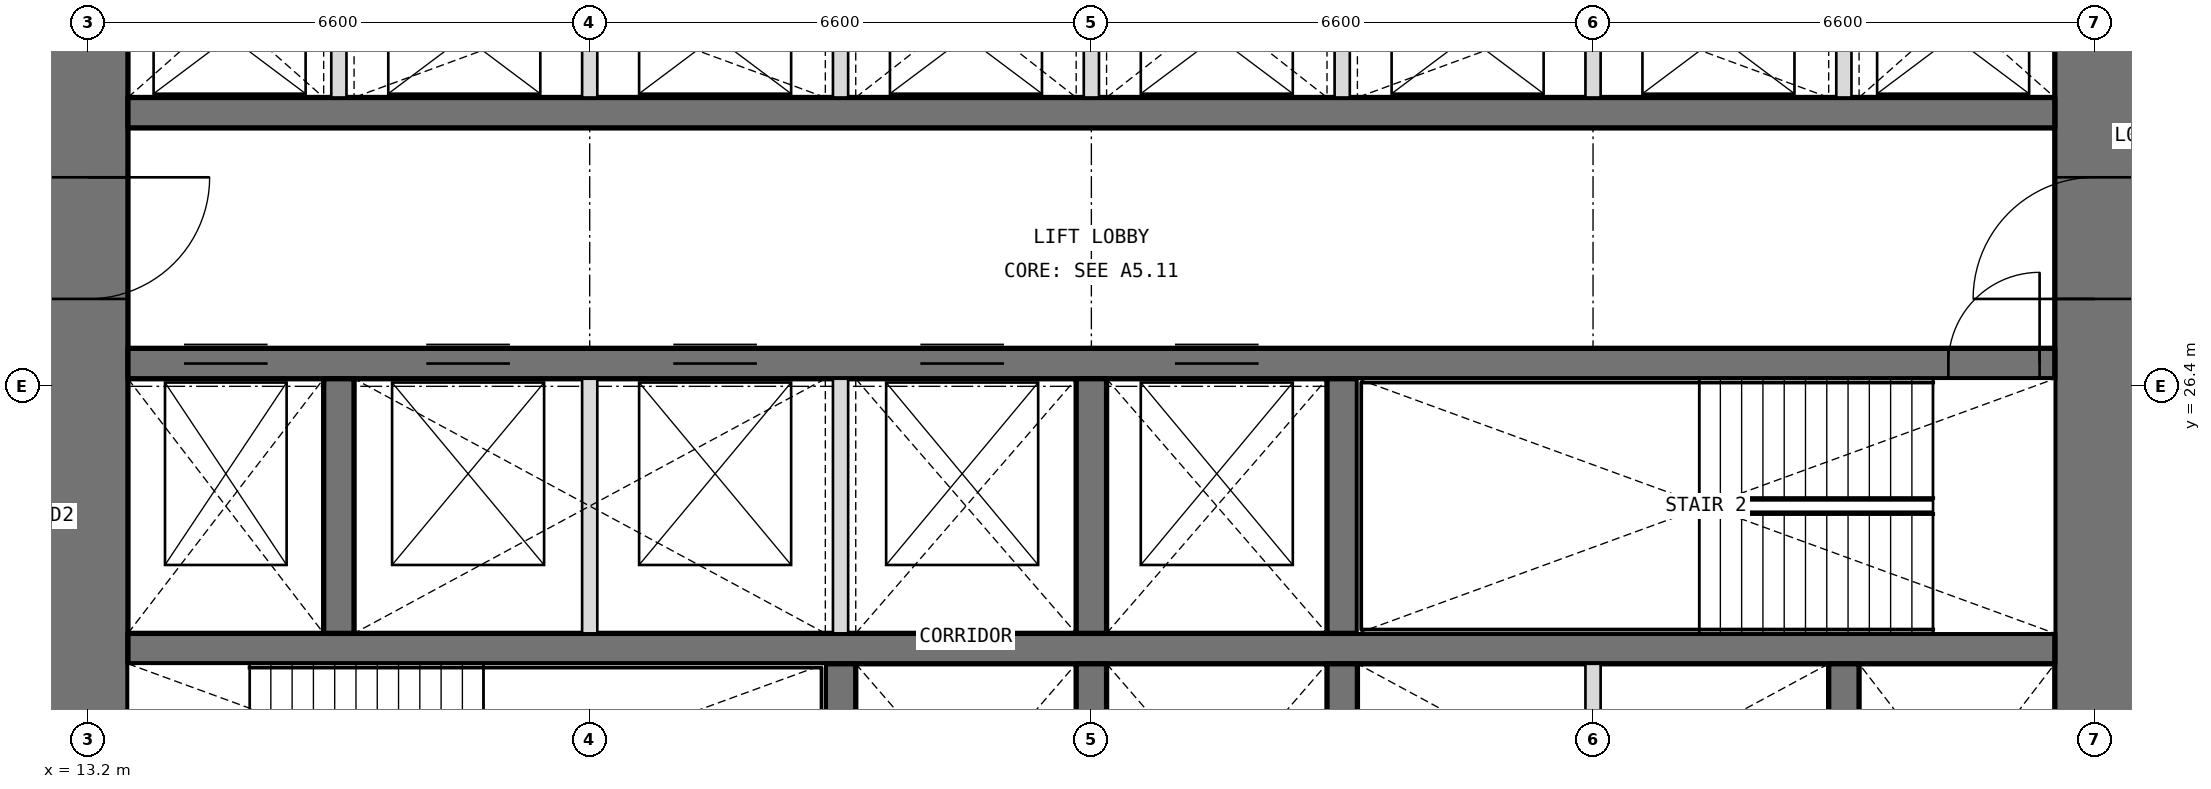
"""IFC4 building model, lengths in metres.
Left out: names, types, materials, properties, quantities, classifications, styles, units other than length and angle.
Written with IfcOpenShell. Run it as: python <this file> out.ifc"""

import sys

from ifc_helpers import new_model, si_unit, direction, frame, frame_2d, origin, place, context, subcontext, project, spatial, rectangle, extrude, element, fill, save


model = new_model("IFC4")
c1 = context("Model", 3, precision=1e-05, world=origin(), true_north=direction((0.0, 1.0)))
c2 = subcontext(c1, "Body", "Model", "MODEL_VIEW")
j1 = project(units=[si_unit("LENGTHUNIT", "METRE"), si_unit("PLANEANGLEUNIT", "RADIAN")], contexts=[c1])
p1 = place(None, origin())
s1 = spatial("IfcSite", under=j1, at=p1, CompositionType="ELEMENT")
p2 = place(p1, origin())
s2 = spatial("IfcBuilding", under=s1, at=p2, CompositionType="ELEMENT")
p3 = place(p2, frame((0.0, 0.0, 42.3)))
s3 = spatial("IfcBuildingStorey", under=s2, at=p3, CompositionType="ELEMENT", Elevation=42.3)
p4 = place(p3, frame((39.6, 13.725, 0.0), z_axis=(0.0, 0.0, 1.0), x_axis=(0.0, 1.0, 0.0)))
e1 = element("IfcWall", 1, at=p4, inside=s3, PredefinedType="SHEAR", context=c2, shape_type="SweptSolid", body=[
    extrude(rectangle(XDim=18.75, YDim=1.05, at=frame_2d((9.375, 0.0))), origin(), (0.0, 0.0, 1.0), 4.2),
])
p5 = place(p4, frame((3.025, 0.0, 0.0)))
e2 = element("IfcOpeningElement", 2, at=p5, cuts=e1, PredefinedType="OPENING", context=c2, shape_type="SweptSolid", body=[
    extrude(rectangle(XDim=1.6, YDim=2.1, at=frame_2d((0.8, 1.05))), frame((0.0, 0.535, 0.0), z_axis=(0.0, -1.0, 0.0), x_axis=(1.0, 0.0, 0.0)), (0.0, 0.0, 1.0), 1.07),
])
p6 = place(p4, frame((13.825, 0.0, 0.0)))
e3 = element("IfcOpeningElement", 3, at=p6, cuts=e1, PredefinedType="OPENING", context=c2, shape_type="SweptSolid", body=[
    extrude(rectangle(XDim=1.6, YDim=2.1, at=frame_2d((0.8, 1.05))), frame((0.0, 0.535, 0.0), z_axis=(0.0, -1.0, 0.0), x_axis=(1.0, 0.0, 0.0)), (0.0, 0.0, 1.0), 1.07),
])
p7 = place(p3, frame((13.2, 32.475, 0.0), z_axis=(0.0, 0.0, 1.0), x_axis=(0.0, -1.0, 0.0)))
e4 = element("IfcWall", 4, at=p7, inside=s3, PredefinedType="SHEAR", context=c2, shape_type="SweptSolid", body=[
    extrude(rectangle(XDim=18.75, YDim=1.05, at=frame_2d((9.375, 0.0))), origin(), (0.0, 0.0, 1.0), 4.2),
])
p8 = place(p7, frame((14.125, 0.0, 0.0)))
e5 = element("IfcOpeningElement", 5, at=p8, cuts=e4, PredefinedType="OPENING", context=c2, shape_type="SweptSolid", body=[
    extrude(rectangle(XDim=1.6, YDim=2.1, at=frame_2d((0.8, 1.05))), frame((0.0, 0.535, 0.0), z_axis=(0.0, -1.0, 0.0), x_axis=(1.0, 0.0, 0.0)), (0.0, 0.0, 1.0), 1.07),
])
p9 = place(p7, frame((3.325, 0.0, 0.0)))
e6 = element("IfcOpeningElement", 6, at=p9, cuts=e4, PredefinedType="OPENING", context=c2, shape_type="SweptSolid", body=[
    extrude(rectangle(XDim=1.6, YDim=2.1, at=frame_2d((0.8, 1.05))), frame((0.0, 0.535, 0.0), z_axis=(0.0, -1.0, 0.0), x_axis=(1.0, 0.0, 0.0)), (0.0, 0.0, 1.0), 1.07),
])
p10 = place(p3, frame((13.725, 22.95, 0.0), z_axis=(0.0, 0.0, 1.0), x_axis=(1.0, 0.0, 0.0)))
e7 = element("IfcWall", 7, at=p10, inside=s3, PredefinedType="SHEAR", context=c2, shape_type="SweptSolid", body=[
    extrude(rectangle(XDim=25.35, YDim=0.4, at=frame_2d((12.675, 0.0))), origin(), (0.0, 0.0, 1.0), 4.2),
])
p11 = place(p3, frame((13.725, 26.7, 0.0), z_axis=(0.0, 0.0, 1.0), x_axis=(1.0, 0.0, 0.0)))
e8 = element("IfcWall", 8, at=p11, inside=s3, PredefinedType="SHEAR", context=c2, shape_type="SweptSolid", body=[
    extrude(rectangle(XDim=25.35, YDim=0.4, at=frame_2d((12.675, 0.0))), origin(), (0.0, 0.0, 1.0), 4.2),
])
p12 = place(p11, frame((23.95, 0.0, 0.0)))
e9 = element("IfcOpeningElement", 9, at=p12, cuts=e8, PredefinedType="OPENING", context=c2, shape_type="SweptSolid", body=[
    extrude(rectangle(XDim=1.2, YDim=2.1, at=frame_2d((0.6, 1.05))), frame((0.0, 0.21, 0.0), z_axis=(0.0, -1.0, 0.0), x_axis=(1.0, 0.0, 0.0)), (0.0, 0.0, 1.0), 0.42),
])
p13 = place(p11, frame((0.738, 0.0, 0.0)))
e10 = element("IfcOpeningElement", 10, at=p13, cuts=e8, PredefinedType="OPENING", context=c2, shape_type="SweptSolid", body=[
    extrude(rectangle(XDim=1.1, YDim=2.1, at=frame_2d((0.55, 1.05))), frame((0.0, 0.21, 0.0), z_axis=(0.0, -1.0, 0.0), x_axis=(1.0, 0.0, 0.0)), (0.0, 0.0, 1.0), 0.42),
])
p14 = place(p11, frame((3.925, 0.0, 0.0)))
e11 = element("IfcOpeningElement", 11, at=p14, cuts=e8, PredefinedType="OPENING", context=c2, shape_type="SweptSolid", body=[
    extrude(rectangle(XDim=1.1, YDim=2.1, at=frame_2d((0.55, 1.05))), frame((0.0, 0.21, 0.0), z_axis=(0.0, -1.0, 0.0), x_axis=(1.0, 0.0, 0.0)), (0.0, 0.0, 1.0), 0.42),
])
p15 = place(p11, frame((7.175, 0.0, 0.0)))
e12 = element("IfcOpeningElement", 12, at=p15, cuts=e8, PredefinedType="OPENING", context=c2, shape_type="SweptSolid", body=[
    extrude(rectangle(XDim=1.1, YDim=2.1, at=frame_2d((0.55, 1.05))), frame((0.0, 0.21, 0.0), z_axis=(0.0, -1.0, 0.0), x_axis=(1.0, 0.0, 0.0)), (0.0, 0.0, 1.0), 0.42),
])
p16 = place(p11, frame((10.425, 0.0, 0.0)))
e13 = element("IfcOpeningElement", 13, at=p16, cuts=e8, PredefinedType="OPENING", context=c2, shape_type="SweptSolid", body=[
    extrude(rectangle(XDim=1.1, YDim=2.1, at=frame_2d((0.55, 1.05))), frame((0.0, 0.21, 0.0), z_axis=(0.0, -1.0, 0.0), x_axis=(1.0, 0.0, 0.0)), (0.0, 0.0, 1.0), 0.42),
])
p17 = place(p11, frame((13.775, 0.0, 0.0)))
e14 = element("IfcOpeningElement", 14, at=p17, cuts=e8, PredefinedType="OPENING", context=c2, shape_type="SweptSolid", body=[
    extrude(rectangle(XDim=1.1, YDim=2.1, at=frame_2d((0.55, 1.05))), frame((0.0, 0.21, 0.0), z_axis=(0.0, -1.0, 0.0), x_axis=(1.0, 0.0, 0.0)), (0.0, 0.0, 1.0), 0.42),
])
p18 = place(p3, frame((13.725, 30.0, 0.0), z_axis=(0.0, 0.0, 1.0), x_axis=(1.0, 0.0, 0.0)))
e15 = element("IfcWall", 15, at=p18, inside=s3, PredefinedType="SHEAR", context=c2, shape_type="SweptSolid", body=[
    extrude(rectangle(XDim=25.35, YDim=0.4, at=frame_2d((12.675, 0.0))), origin(), (0.0, 0.0, 1.0), 4.2),
])
for number, where, z_axis, x_axis in (
    (16, (23.1, 19.4, 0.0), (0.0, 0.0, 1.0), (0.0, 1.0, 0.0)),
    (17, (26.4, 19.4, 0.0), (0.0, 0.0, 1.0), (0.0, 1.0, 0.0)),
    (18, (29.7, 19.4, 0.0), (0.0, 0.0, 1.0), (0.0, 1.0, 0.0)),
    (19, (36.3, 19.4, 0.0), (0.0, 0.0, 1.0), (0.0, 1.0, 0.0)),
    (20, (16.5, 23.15, 0.0), (0.0, 0.0, 1.0), (0.0, 1.0, 0.0)),
    (21, (26.4, 23.15, 0.0), (0.0, 0.0, 1.0), (0.0, 1.0, 0.0)),
    (22, (29.7, 23.15, 0.0), (0.0, 0.0, 1.0), (0.0, 1.0, 0.0)),
):
    element("IfcWall", number, at=place(p3, frame(where, z_axis=z_axis, x_axis=x_axis)), inside=s3, PredefinedType="SHEAR", context=c2, shape_type="SweptSolid", body=[
        extrude(rectangle(XDim=3.35, YDim=0.4, at=frame_2d((1.675, 0.0))), origin(), (0.0, 0.0, 1.0), 4.2),
    ])
for number, where, z_axis, x_axis in (
    (23, (16.5, 30.2, 0.0), (0.0, 0.0, 1.0), (0.0, 1.0, 0.0)),
    (24, (19.8, 30.2, 0.0), (0.0, 0.0, 1.0), (0.0, 1.0, 0.0)),
    (25, (23.1, 30.2, 0.0), (0.0, 0.0, 1.0), (0.0, 1.0, 0.0)),
    (26, (26.4, 30.2, 0.0), (0.0, 0.0, 1.0), (0.0, 1.0, 0.0)),
    (27, (29.7, 30.2, 0.0), (0.0, 0.0, 1.0), (0.0, 1.0, 0.0)),
    (28, (33.0, 30.2, 0.0), (0.0, 0.0, 1.0), (0.0, 1.0, 0.0)),
    (29, (36.3, 30.2, 0.0), (0.0, 0.0, 1.0), (0.0, 1.0, 0.0)),
):
    element("IfcWall", number, at=place(p3, frame(where, z_axis=z_axis, x_axis=x_axis)), inside=s3, PredefinedType="PARTITIONING", context=c2, shape_type="SweptSolid", body=[
        extrude(rectangle(XDim=2.275, YDim=0.2, at=frame_2d((1.138, 0.0))), origin(), (0.0, 0.0, 1.0), 4.2),
    ])
for number, where, z_axis, x_axis in (
    (30, (33.0, 19.4, 0.0), (0.0, 0.0, 1.0), (0.0, 1.0, 0.0)),
    (31, (19.8, 23.15, 0.0), (0.0, 0.0, 1.0), (0.0, 1.0, 0.0)),
    (32, (23.1, 23.15, 0.0), (0.0, 0.0, 1.0), (0.0, 1.0, 0.0)),
):
    element("IfcWall", number, at=place(p3, frame(where, z_axis=z_axis, x_axis=x_axis)), inside=s3, PredefinedType="PARTITIONING", context=c2, shape_type="SweptSolid", body=[
        extrude(rectangle(XDim=3.35, YDim=0.2, at=frame_2d((1.675, 0.0))), origin(), (0.0, 0.0, 1.0), 4.2),
    ])
p19 = place(p12, origin())
e33 = element("IfcDoor", 33, at=p19, inside=s3, OperationType="SINGLE_SWING_RIGHT", PredefinedType="DOOR", context=c2, shape_type="SweptSolid", body=[
    extrude(rectangle(XDim=1.2, YDim=2.1, at=frame_2d((0.6, 1.05))), frame((0.0, 0.025, 0.0), z_axis=(0.0, -1.0, 0.0), x_axis=(1.0, 0.0, 0.0)), (0.0, 0.0, 1.0), 0.05),
])
fill(e9, e33)
p20 = place(p9, origin())
e34 = element("IfcDoor", 34, at=p20, inside=s3, OperationType="DOUBLE_DOOR_DOUBLE_SWING", PredefinedType="DOOR", context=c2, shape_type="SweptSolid", body=[
    extrude(rectangle(XDim=1.6, YDim=2.1, at=frame_2d((0.8, 1.05))), frame((0.0, 0.025, 0.0), z_axis=(0.0, -1.0, 0.0), x_axis=(1.0, 0.0, 0.0)), (0.0, 0.0, 1.0), 0.05),
])
fill(e6, e34)
p21 = place(p6, origin())
e35 = element("IfcDoor", 35, at=p21, inside=s3, OperationType="DOUBLE_DOOR_DOUBLE_SWING", PredefinedType="DOOR", context=c2, shape_type="SweptSolid", body=[
    extrude(rectangle(XDim=1.6, YDim=2.1, at=frame_2d((0.8, 1.05))), frame((0.0, 0.025, 0.0), z_axis=(0.0, -1.0, 0.0), x_axis=(1.0, 0.0, 0.0)), (0.0, 0.0, 1.0), 0.05),
])
fill(e3, e35)
p22 = place(p13, origin())
e36 = element("IfcDoor", 36, at=p22, inside=s3, OperationType="DOUBLE_DOOR_SLIDING", PredefinedType="DOOR", context=c2, shape_type="SweptSolid", body=[
    extrude(rectangle(XDim=1.1, YDim=2.1, at=frame_2d((0.55, 1.05))), frame((0.0, 0.025, 0.0), z_axis=(0.0, -1.0, 0.0), x_axis=(1.0, 0.0, 0.0)), (0.0, 0.0, 1.0), 0.05),
])
fill(e10, e36)
p23 = place(p14, origin())
e37 = element("IfcDoor", 37, at=p23, inside=s3, OperationType="DOUBLE_DOOR_SLIDING", PredefinedType="DOOR", context=c2, shape_type="SweptSolid", body=[
    extrude(rectangle(XDim=1.1, YDim=2.1, at=frame_2d((0.55, 1.05))), frame((0.0, 0.025, 0.0), z_axis=(0.0, -1.0, 0.0), x_axis=(1.0, 0.0, 0.0)), (0.0, 0.0, 1.0), 0.05),
])
fill(e11, e37)
p24 = place(p15, origin())
e38 = element("IfcDoor", 38, at=p24, inside=s3, OperationType="DOUBLE_DOOR_SLIDING", PredefinedType="DOOR", context=c2, shape_type="SweptSolid", body=[
    extrude(rectangle(XDim=1.1, YDim=2.1, at=frame_2d((0.55, 1.05))), frame((0.0, 0.025, 0.0), z_axis=(0.0, -1.0, 0.0), x_axis=(1.0, 0.0, 0.0)), (0.0, 0.0, 1.0), 0.05),
])
fill(e12, e38)
p25 = place(p16, origin())
e39 = element("IfcDoor", 39, at=p25, inside=s3, OperationType="DOUBLE_DOOR_SLIDING", PredefinedType="DOOR", context=c2, shape_type="SweptSolid", body=[
    extrude(rectangle(XDim=1.1, YDim=2.1, at=frame_2d((0.55, 1.05))), frame((0.0, 0.025, 0.0), z_axis=(0.0, -1.0, 0.0), x_axis=(1.0, 0.0, 0.0)), (0.0, 0.0, 1.0), 0.05),
])
fill(e13, e39)
p26 = place(p17, origin())
e40 = element("IfcDoor", 40, at=p26, inside=s3, OperationType="DOUBLE_DOOR_SLIDING", PredefinedType="DOOR", context=c2, shape_type="SweptSolid", body=[
    extrude(rectangle(XDim=1.1, YDim=2.1, at=frame_2d((0.55, 1.05))), frame((0.0, 0.025, 0.0), z_axis=(0.0, -1.0, 0.0), x_axis=(1.0, 0.0, 0.0)), (0.0, 0.0, 1.0), 0.05),
])
fill(e14, e40)
save(model, sys.argv[1])
